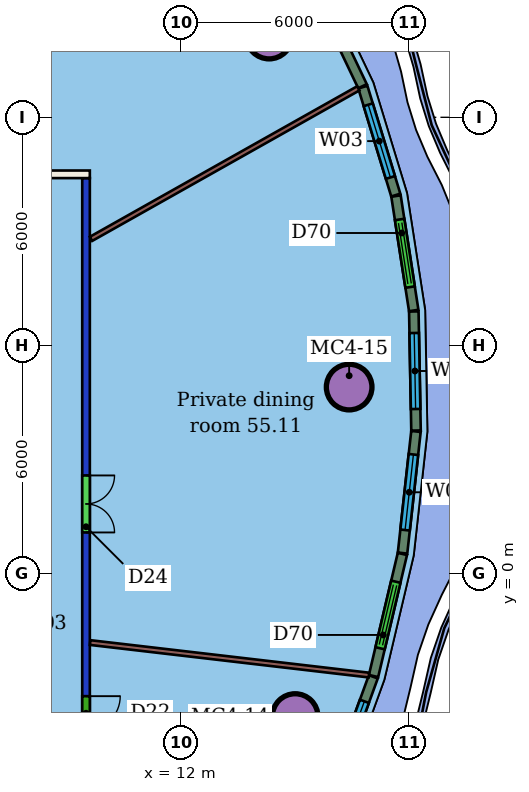
"""IFC4 building model, lengths in metres.
Left out: names, types, materials, properties, quantities, classifications, styles, units other than length and angle.
Written with IfcOpenShell. Run it as: python <this file> out.ifc"""

import sys

from ifc_helpers import new_model, si_unit, direction, frame, frame_2d, origin, origin_2d, place, context, subcontext, project, spatial, rectangle, hollow_circle, extrude, element, fill, save


model = new_model("IFC4")
c1 = context("Model", 3, precision=1e-05, world=origin(), true_north=direction((0.0, 1.0)))
c2 = subcontext(c1, "Body", "Model", "MODEL_VIEW")
j1 = project(units=[si_unit("LENGTHUNIT", "METRE"), si_unit("PLANEANGLEUNIT", "RADIAN")], contexts=[c1])
p1 = place(None, origin())
s1 = spatial("IfcSite", under=j1, at=p1, CompositionType="ELEMENT")
p2 = place(p1, origin())
s2 = spatial("IfcBuilding", under=s1, at=p2, CompositionType="ELEMENT")
p3 = place(p2, frame((0.0, 0.0, 224.5)))
s3 = spatial("IfcBuildingStorey", under=s2, at=p3, CompositionType="ELEMENT", Elevation=224.5)
for number, where, z_axis, x_axis in (
    (1, (15.003, -3.768, 0.0), (0.0, 0.0, 1.0), (1.0, 0.0, 0.0)),
    (2, (16.424, 4.901, 0.0), (0.0, 0.0, 1.0), (1.0, 0.0, 0.0)),
    (3, (14.318, 14.137, 0.0), (0.0, 0.0, 1.0), (1.0, 0.0, 0.0)),
):
    element("IfcColumn", number, at=place(p3, frame(where, z_axis=z_axis, x_axis=x_axis)), inside=s3, PredefinedType="COLUMN", context=c2, shape_type="SweptSolid", body=[
        extrude(hollow_circle(Radius=0.6, WallThickness=0.045, at=origin_2d()), origin(), (0.0, 0.0, 1.0), 3.45),
    ])
p4 = place(p3, frame((-21.6, 10.5, 0.0), z_axis=(0.0, 0.0, 1.0), x_axis=(1.0, 0.0, 0.0)))
e4 = element("IfcWall", 4, at=p4, inside=s3, PredefinedType="PARTITIONING", context=c2, shape_type="SweptSolid", body=[
    extrude(rectangle(XDim=31.2, YDim=0.2, at=frame_2d((15.6, 0.0))), origin(), (0.0, 0.0, 1.0), 3.45),
])
p5 = place(p4, frame((20.263, 0.0, 0.0)))
e5 = element("IfcOpeningElement", 5, at=p5, cuts=e4, PredefinedType="OPENING", context=c2, shape_type="SweptSolid", body=[
    extrude(rectangle(XDim=1.0, YDim=2.4, at=frame_2d((0.5, 1.2))), frame((0.0, 0.11, 0.0), z_axis=(0.0, -1.0, 0.0), x_axis=(1.0, 0.0, 0.0)), (0.0, 0.0, 1.0), 0.22),
])
p6 = place(p4, frame((12.806, 0.0, 0.0)))
e6 = element("IfcOpeningElement", 6, at=p6, cuts=e4, PredefinedType="OPENING", context=c2, shape_type="SweptSolid", body=[
    extrude(rectangle(XDim=0.9, YDim=2.1, at=frame_2d((0.45, 1.05))), frame((0.0, 0.11, 0.0), z_axis=(0.0, -1.0, 0.0), x_axis=(1.0, 0.0, 0.0)), (0.0, 0.0, 1.0), 0.22),
])
p7 = place(p4, frame((9.389, 0.0, 0.0)))
e7 = element("IfcOpeningElement", 7, at=p7, cuts=e4, PredefinedType="OPENING", context=c2, shape_type="SweptSolid", body=[
    extrude(rectangle(XDim=0.9, YDim=2.1, at=frame_2d((0.45, 1.05))), frame((0.0, 0.11, 0.0), z_axis=(0.0, -1.0, 0.0), x_axis=(1.0, 0.0, 0.0)), (0.0, 0.0, 1.0), 0.22),
])
p8 = place(p4, frame((25.454, 0.0, 0.0)))
e8 = element("IfcOpeningElement", 8, at=p8, cuts=e4, PredefinedType="OPENING", context=c2, shape_type="SweptSolid", body=[
    extrude(rectangle(XDim=1.2, YDim=2.4, at=frame_2d((0.6, 1.2))), frame((0.0, 0.11, 0.0), z_axis=(0.0, -1.0, 0.0), x_axis=(1.0, 0.0, 0.0)), (0.0, 0.0, 1.0), 0.22),
])
p9 = place(p3, frame((9.5, 10.4, 0.0), z_axis=(0.0, 0.0, 1.0), x_axis=(0.0, -1.0, 0.0)))
e9 = element("IfcWall", 9, at=p9, inside=s3, PredefinedType="PARTITIONING", context=c2, shape_type="SweptSolid", body=[
    extrude(rectangle(XDim=20.8, YDim=0.2, at=frame_2d((10.4, 0.0))), origin(), (0.0, 0.0, 1.0), 3.05),
])
p10 = place(p9, frame((13.631, 0.0, 0.0)))
e10 = element("IfcOpeningElement", 10, at=p10, cuts=e9, PredefinedType="OPENING", context=c2, shape_type="SweptSolid", body=[
    extrude(rectangle(XDim=0.9, YDim=2.1, at=frame_2d((0.45, 1.05))), frame((0.0, 0.11, 0.0), z_axis=(0.0, -1.0, 0.0), x_axis=(1.0, 0.0, 0.0)), (0.0, 0.0, 1.0), 0.22),
])
p11 = place(p9, frame((7.823, 0.0, 0.0)))
e11 = element("IfcOpeningElement", 11, at=p11, cuts=e9, PredefinedType="OPENING", context=c2, shape_type="SweptSolid", body=[
    extrude(rectangle(XDim=1.5, YDim=2.1, at=frame_2d((0.75, 1.05))), frame((0.0, 0.11, 0.0), z_axis=(0.0, -1.0, 0.0), x_axis=(1.0, 0.0, 0.0)), (0.0, 0.0, 1.0), 0.22),
])
p12 = place(p3, frame((9.588, 21.542, 0.0), z_axis=(0.0, 0.0, 1.0), x_axis=(-0.586235299026, -0.810140836013, 0.0)))
e12 = element("IfcWall", 12, at=p12, inside=s3, PredefinedType="PARTITIONING", context=c2, shape_type="SweptSolid", body=[
    extrude(rectangle(XDim=13.461, YDim=0.125, at=frame_2d((6.73, 0.0))), origin(), (0.0, 0.0, 1.0), 3.45),
])
p13 = place(p3, frame((16.943, -2.676, 0.0), z_axis=(0.0, 0.0, 1.0), x_axis=(-0.993265421739, 0.115861132295, 0.0)))
e13 = element("IfcWall", 13, at=p13, inside=s3, PredefinedType="PARTITIONING", context=c2, shape_type="SweptSolid", body=[
    extrude(rectangle(XDim=7.386, YDim=0.125, at=frame_2d((3.693, 0.0))), origin(), (0.0, 0.0, 1.0), 3.45),
])
p14 = place(p3, frame((16.664, 12.761, 0.0), z_axis=(0.0, 0.0, 1.0), x_axis=(-0.871369479299, -0.490627384627, 0.0)))
e14 = element("IfcWall", 14, at=p14, inside=s3, PredefinedType="PARTITIONING", context=c2, shape_type="SweptSolid", body=[
    extrude(rectangle(XDim=8.072, YDim=0.125, at=frame_2d((4.036, 0.0))), origin(), (0.0, 0.0, 1.0), 3.45),
])
p15 = place(p3, frame((15.906, -5.89, 0.0), z_axis=(0.0, 0.0, 1.0), x_axis=(0.341964011847, 0.939713049075, 0.0)))
e15 = element("IfcWall", 15, at=p15, inside=s3, PredefinedType="SOLIDWALL", context=c2, shape_type="SweptSolid", body=[
    extrude(rectangle(XDim=3.371, YDim=0.25, at=frame_2d((1.686, 0.0))), origin(), (0.0, 0.0, 1.0), 3.1),
])
p16 = place(p15, frame((0.686, 0.0, 0.9)))
e16 = element("IfcOpeningElement", 16, at=p16, cuts=e15, PredefinedType="OPENING", context=c2, shape_type="SweptSolid", body=[
    extrude(rectangle(XDim=2.0, YDim=2.1, at=frame_2d((1.0, 1.05))), frame((0.0, 0.135, 0.0), z_axis=(0.0, -1.0, 0.0), x_axis=(1.0, 0.0, 0.0)), (0.0, 0.0, 1.0), 0.27),
])
p17 = place(p3, frame((17.066, -2.701, 0.0), z_axis=(0.0, 0.0, 1.0), x_axis=(0.229983418088, 0.973194547562, 0.0)))
e17 = element("IfcWall", 17, at=p17, inside=s3, PredefinedType="SOLIDWALL", context=c2, shape_type="SweptSolid", body=[
    extrude(rectangle(XDim=3.3, YDim=0.25, at=frame_2d((1.65, 0.0))), origin(), (0.0, 0.0, 1.0), 3.1),
])
p18 = place(p17, frame((0.75, 0.0, 0.0)))
e18 = element("IfcOpeningElement", 18, at=p18, cuts=e17, PredefinedType="OPENING", context=c2, shape_type="SweptSolid", body=[
    extrude(rectangle(XDim=1.8, YDim=2.4, at=frame_2d((0.9, 1.2))), frame((0.0, 0.135, 0.0), z_axis=(0.0, -1.0, 0.0), x_axis=(1.0, 0.0, 0.0)), (0.0, 0.0, 1.0), 0.27),
])
p19 = place(p3, frame((17.829, 0.534, 0.0), z_axis=(0.0, 0.0, 1.0), x_axis=(0.10972407218, 0.993962085788, 0.0)))
e19 = element("IfcWall", 19, at=p19, inside=s3, PredefinedType="SOLIDWALL", context=c2, shape_type="SweptSolid", body=[
    extrude(rectangle(XDim=3.22, YDim=0.25, at=frame_2d((1.61, 0.0))), origin(), (0.0, 0.0, 1.0), 3.1),
])
p20 = place(p19, frame((0.61, 0.0, 0.9)))
e20 = element("IfcOpeningElement", 20, at=p20, cuts=e19, PredefinedType="OPENING", context=c2, shape_type="SweptSolid", body=[
    extrude(rectangle(XDim=2.0, YDim=2.1, at=frame_2d((1.0, 1.05))), frame((0.0, 0.135, 0.0), z_axis=(0.0, -1.0, 0.0), x_axis=(1.0, 0.0, 0.0)), (0.0, 0.0, 1.0), 0.27),
])
p21 = place(p3, frame((18.183, 3.758, 0.0), z_axis=(0.0, 0.0, 1.0), x_axis=(-0.018385546929, 0.999830971547, 0.0)))
e21 = element("IfcWall", 21, at=p21, inside=s3, PredefinedType="SOLIDWALL", context=c2, shape_type="SweptSolid", body=[
    extrude(rectangle(XDim=3.134, YDim=0.25, at=frame_2d((1.567, 0.0))), origin(), (0.0, 0.0, 1.0), 3.1),
])
p22 = place(p21, frame((0.567, 0.0, 0.9)))
e22 = element("IfcOpeningElement", 22, at=p22, cuts=e21, PredefinedType="OPENING", context=c2, shape_type="SweptSolid", body=[
    extrude(rectangle(XDim=2.0, YDim=2.1, at=frame_2d((1.0, 1.05))), frame((0.0, 0.135, 0.0), z_axis=(0.0, -1.0, 0.0), x_axis=(1.0, 0.0, 0.0)), (0.0, 0.0, 1.0), 0.27),
])
p23 = place(p3, frame((18.123, 6.916, 0.0), z_axis=(0.0, 0.0, 1.0), x_axis=(-0.15305011878, 0.98821842785, 0.0)))
e23 = element("IfcWall", 23, at=p23, inside=s3, PredefinedType="SOLIDWALL", context=c2, shape_type="SweptSolid", body=[
    extrude(rectangle(XDim=3.048, YDim=0.25, at=frame_2d((1.524, 0.0))), origin(), (0.0, 0.0, 1.0), 3.1),
])
p24 = place(p23, frame((0.624, 0.0, 0.0)))
e24 = element("IfcOpeningElement", 24, at=p24, cuts=e23, PredefinedType="OPENING", context=c2, shape_type="SweptSolid", body=[
    extrude(rectangle(XDim=1.8, YDim=2.4, at=frame_2d((0.9, 1.2))), frame((0.0, 0.135, 0.0), z_axis=(0.0, -1.0, 0.0), x_axis=(1.0, 0.0, 0.0)), (0.0, 0.0, 1.0), 0.27),
])
p25 = place(p3, frame((17.651, 9.954, 0.0), z_axis=(0.0, 0.0, 1.0), x_axis=(-0.291704653899, 0.956508439531, 0.0)))
e25 = element("IfcWall", 25, at=p25, inside=s3, PredefinedType="SOLIDWALL", context=c2, shape_type="SweptSolid", body=[
    extrude(rectangle(XDim=2.969, YDim=0.25, at=frame_2d((1.485, 0.0))), origin(), (0.0, 0.0, 1.0), 3.1),
])
p26 = place(p25, frame((0.485, 0.0, 0.9)))
e26 = element("IfcOpeningElement", 26, at=p26, cuts=e25, PredefinedType="OPENING", context=c2, shape_type="SweptSolid", body=[
    extrude(rectangle(XDim=2.0, YDim=2.1, at=frame_2d((1.0, 1.05))), frame((0.0, 0.135, 0.0), z_axis=(0.0, -1.0, 0.0), x_axis=(1.0, 0.0, 0.0)), (0.0, 0.0, 1.0), 0.27),
])
p27 = place(p3, frame((16.775, 12.819, 0.0), z_axis=(0.0, 0.0, 1.0), x_axis=(-0.430486422768, 0.902597052849, 0.0)))
e27 = element("IfcWall", 27, at=p27, inside=s3, PredefinedType="SOLIDWALL", context=c2, shape_type="SweptSolid", body=[
    extrude(rectangle(XDim=2.862, YDim=0.25, at=frame_2d((1.431, 0.0))), origin(), (0.0, 0.0, 1.0), 3.1),
])
p28 = place(p10, origin())
e28 = element("IfcDoor", 28, at=p28, inside=s3, OperationType="SINGLE_SWING_LEFT", PredefinedType="DOOR", context=c2, shape_type="SweptSolid", body=[
    extrude(rectangle(XDim=0.9, YDim=2.1, at=frame_2d((0.45, 1.05))), frame((0.0, 0.025, 0.0), z_axis=(0.0, -1.0, 0.0), x_axis=(1.0, 0.0, 0.0)), (0.0, 0.0, 1.0), 0.05),
])
fill(e10, e28)
p29 = place(p11, origin())
e29 = element("IfcDoor", 29, at=p29, inside=s3, OperationType="DOUBLE_DOOR_SINGLE_SWING", PredefinedType="DOOR", context=c2, shape_type="SweptSolid", body=[
    extrude(rectangle(XDim=1.5, YDim=2.1, at=frame_2d((0.75, 1.05))), frame((0.0, 0.025, 0.0), z_axis=(0.0, -1.0, 0.0), x_axis=(1.0, 0.0, 0.0)), (0.0, 0.0, 1.0), 0.05),
])
fill(e11, e29)
p30 = place(p16, origin())
e30 = element("IfcWindow", 30, at=p30, inside=s3, PartitioningType="SINGLE_PANEL", PredefinedType="WINDOW", context=c2, shape_type="SweptSolid", body=[
    extrude(rectangle(XDim=2.0, YDim=2.1, at=frame_2d((1.0, 1.05))), frame((0.0, 0.03, 0.0), z_axis=(0.0, -1.0, 0.0), x_axis=(1.0, 0.0, 0.0)), (0.0, 0.0, 1.0), 0.06),
])
fill(e16, e30)
p31 = place(p18, origin())
e31 = element("IfcDoor", 31, at=p31, inside=s3, OperationType="DOUBLE_DOOR_SLIDING", PredefinedType="DOOR", context=c2, shape_type="SweptSolid", body=[
    extrude(rectangle(XDim=1.8, YDim=2.4, at=frame_2d((0.9, 1.2))), frame((0.0, 0.025, 0.0), z_axis=(0.0, -1.0, 0.0), x_axis=(1.0, 0.0, 0.0)), (0.0, 0.0, 1.0), 0.05),
])
fill(e18, e31)
p32 = place(p20, origin())
e32 = element("IfcWindow", 32, at=p32, inside=s3, PartitioningType="SINGLE_PANEL", PredefinedType="WINDOW", context=c2, shape_type="SweptSolid", body=[
    extrude(rectangle(XDim=2.0, YDim=2.1, at=frame_2d((1.0, 1.05))), frame((0.0, 0.03, 0.0), z_axis=(0.0, -1.0, 0.0), x_axis=(1.0, 0.0, 0.0)), (0.0, 0.0, 1.0), 0.06),
])
fill(e20, e32)
p33 = place(p22, origin())
e33 = element("IfcWindow", 33, at=p33, inside=s3, PartitioningType="SINGLE_PANEL", PredefinedType="WINDOW", context=c2, shape_type="SweptSolid", body=[
    extrude(rectangle(XDim=2.0, YDim=2.1, at=frame_2d((1.0, 1.05))), frame((0.0, 0.03, 0.0), z_axis=(0.0, -1.0, 0.0), x_axis=(1.0, 0.0, 0.0)), (0.0, 0.0, 1.0), 0.06),
])
fill(e22, e33)
p34 = place(p24, origin())
e34 = element("IfcDoor", 34, at=p34, inside=s3, OperationType="DOUBLE_DOOR_SLIDING", PredefinedType="DOOR", context=c2, shape_type="SweptSolid", body=[
    extrude(rectangle(XDim=1.8, YDim=2.4, at=frame_2d((0.9, 1.2))), frame((0.0, 0.025, 0.0), z_axis=(0.0, -1.0, 0.0), x_axis=(1.0, 0.0, 0.0)), (0.0, 0.0, 1.0), 0.05),
])
fill(e24, e34)
p35 = place(p26, origin())
e35 = element("IfcWindow", 35, at=p35, inside=s3, PartitioningType="SINGLE_PANEL", PredefinedType="WINDOW", context=c2, shape_type="SweptSolid", body=[
    extrude(rectangle(XDim=2.0, YDim=2.1, at=frame_2d((1.0, 1.05))), frame((0.0, 0.03, 0.0), z_axis=(0.0, -1.0, 0.0), x_axis=(1.0, 0.0, 0.0)), (0.0, 0.0, 1.0), 0.06),
])
fill(e26, e35)
save(model, sys.argv[1])
